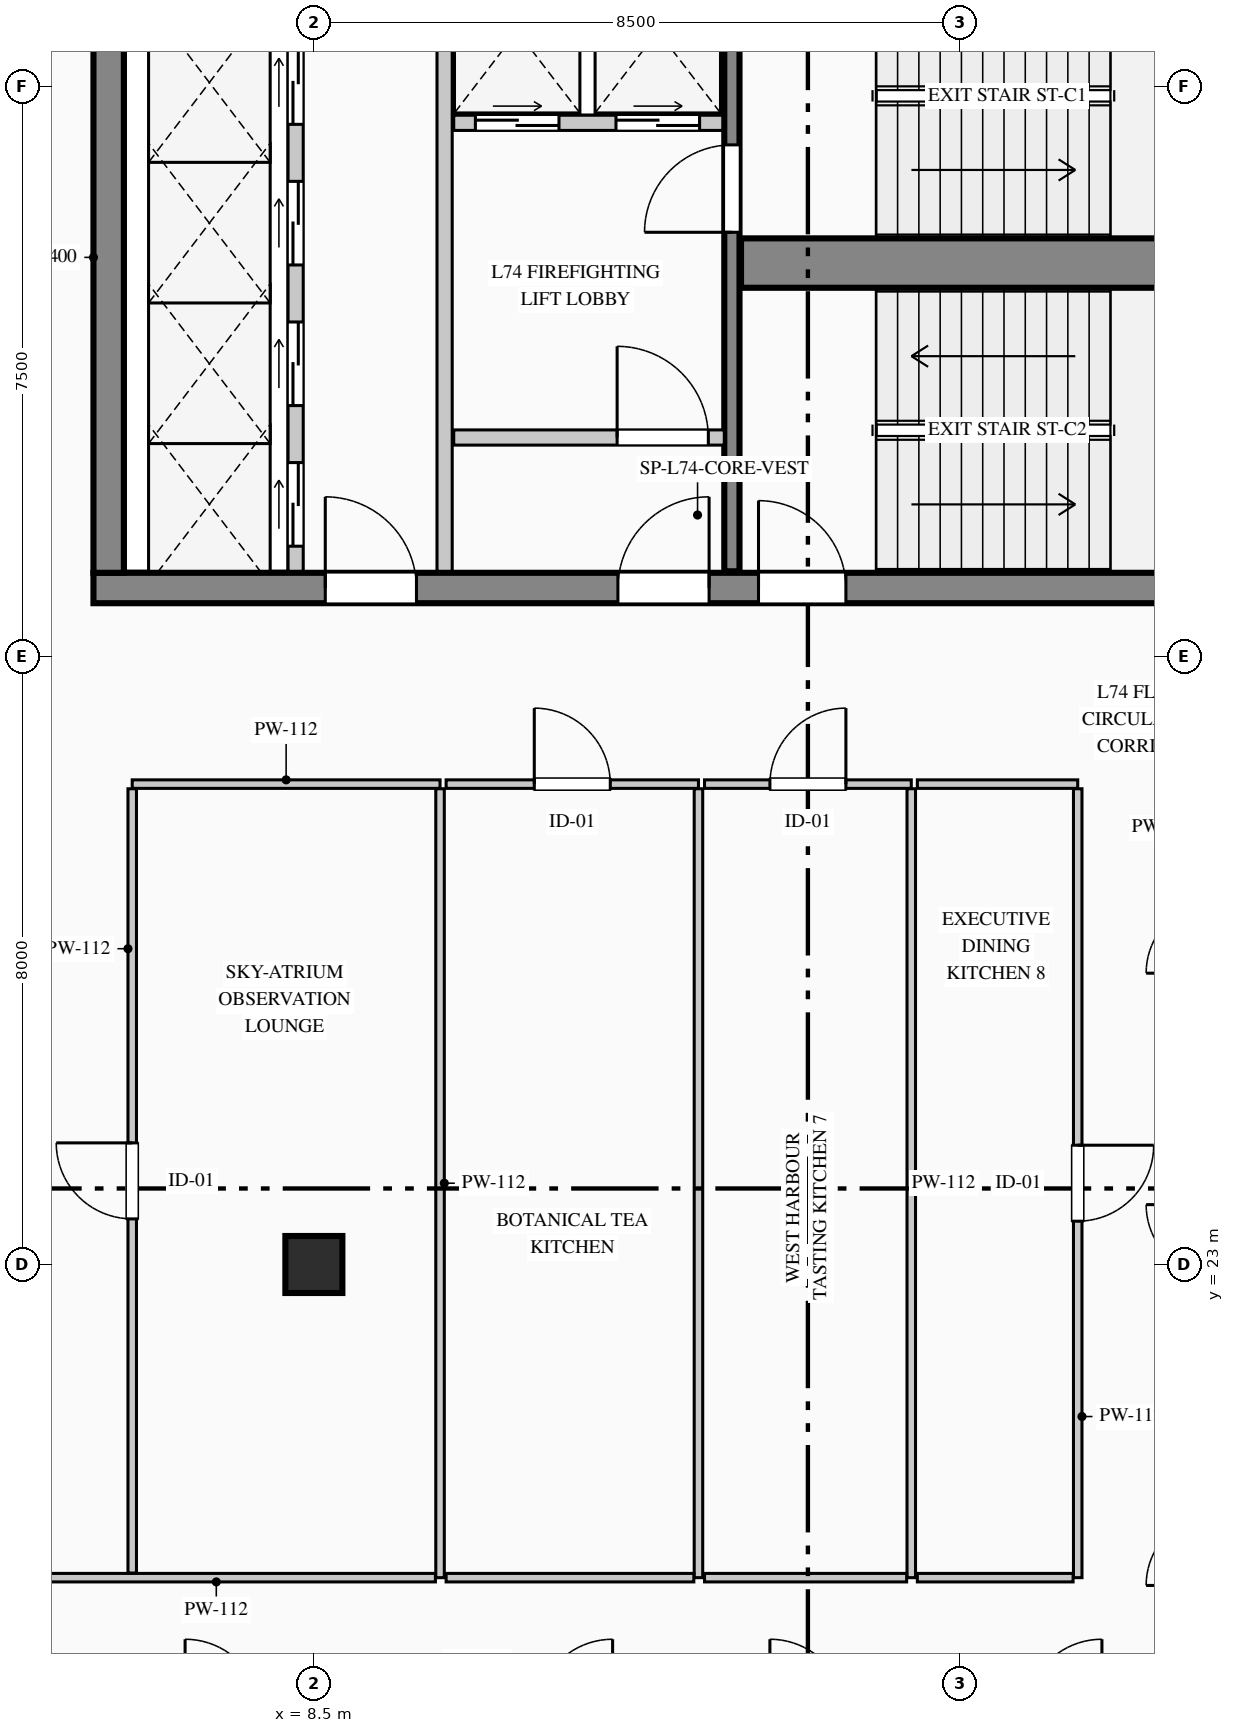
"""IFC4 building model, lengths in metres.
Left out: names, types, materials, properties, quantities, classifications, styles, units other than length and angle.
Written with IfcOpenShell. Run it as: python <this file> out.ifc"""

import sys

from ifc_helpers import new_model, si_unit, direction, frame, frame_2d, origin, origin_2d, place, context, subcontext, project, spatial, rectangle, extrude, element, fill, save


model = new_model("IFC4")
c1 = context("Model", 3, precision=1e-05, world=origin(), true_north=direction((0.0, 1.0)))
c2 = subcontext(c1, "Body", "Model", "MODEL_VIEW")
j1 = project(units=[si_unit("LENGTHUNIT", "METRE"), si_unit("PLANEANGLEUNIT", "RADIAN")], contexts=[c1])
p1 = place(None, origin())
s1 = spatial("IfcSite", under=j1, at=p1, CompositionType="ELEMENT")
p2 = place(p1, origin())
s2 = spatial("IfcBuilding", under=s1, at=p2, CompositionType="ELEMENT")
p3 = place(p2, frame((0.0, 0.0, 308.05)))
s3 = spatial("IfcBuildingStorey", under=s2, at=p3, CompositionType="ELEMENT", Elevation=308.05)
p4 = place(p3, frame((5.6, 31.9, 0.0), z_axis=(0.0, 0.0, 1.0), x_axis=(1.0, 0.0, 0.0)))
e1 = element("IfcWall", 1, at=p4, inside=s3, PredefinedType="SHEAR", context=c2, shape_type="SweptSolid", body=[
    extrude(rectangle(XDim=17.65, YDim=0.4, at=frame_2d((8.825, 0.0))), origin(), (0.0, 0.0, 1.0), 3.95),
])
p5 = place(p4, frame((3.05, 0.0, 0.0)))
e2 = element("IfcOpeningElement", 2, at=p5, cuts=e1, PredefinedType="OPENING", context=c2, shape_type="SweptSolid", body=[
    extrude(rectangle(XDim=1.2, YDim=2.2, at=frame_2d((0.6, 1.1))), frame((0.0, 0.21, 0.0), z_axis=(0.0, -1.0, 0.0), x_axis=(1.0, 0.0, 0.0)), (0.0, 0.0, 1.0), 0.42),
])
p6 = place(p4, frame((6.9, 0.0, 0.0)))
e3 = element("IfcOpeningElement", 3, at=p6, cuts=e1, PredefinedType="OPENING", context=c2, shape_type="SweptSolid", body=[
    extrude(rectangle(XDim=1.2, YDim=2.2, at=frame_2d((0.6, 1.1))), frame((0.0, 0.21, 0.0), z_axis=(0.0, -1.0, 0.0), x_axis=(1.0, 0.0, 0.0)), (0.0, 0.0, 1.0), 0.42),
])
p7 = place(p4, frame((8.75, 0.0, 0.0)))
e4 = element("IfcOpeningElement", 4, at=p7, cuts=e1, PredefinedType="OPENING", context=c2, shape_type="SweptSolid", body=[
    extrude(rectangle(XDim=1.15, YDim=2.2, at=frame_2d((0.575, 1.1))), frame((0.0, 0.21, 0.0), z_axis=(0.0, -1.0, 0.0), x_axis=(1.0, 0.0, 0.0)), (0.0, 0.0, 1.0), 0.42),
])
p8 = place(p4, frame((15.85, 0.0, 0.0)))
e5 = element("IfcOpeningElement", 5, at=p8, cuts=e1, PredefinedType="OPENING", context=c2, shape_type="SweptSolid", body=[
    extrude(rectangle(XDim=1.2, YDim=2.2, at=frame_2d((0.6, 1.1))), frame((0.0, 0.21, 0.0), z_axis=(0.0, -1.0, 0.0), x_axis=(1.0, 0.0, 0.0)), (0.0, 0.0, 1.0), 0.42),
])
p9 = place(p3, frame((5.8, 32.1, 0.0), z_axis=(0.0, 0.0, 1.0), x_axis=(0.0, 1.0, 0.0)))
e6 = element("IfcWall", 6, at=p9, inside=s3, PredefinedType="SHEAR", context=c2, shape_type="SweptSolid", body=[
    extrude(rectangle(XDim=8.3, YDim=0.4, at=frame_2d((4.15, 0.0))), origin(), (0.0, 0.0, 1.0), 3.95),
])
p10 = place(p3, frame((14.0, 32.12, 0.0), z_axis=(0.0, 0.0, 1.0), x_axis=(0.0, 1.0, 0.0)))
e7 = element("IfcWall", 7, at=p10, inside=s3, PredefinedType="SHEAR", context=c2, shape_type="SweptSolid", body=[
    extrude(rectangle(XDim=8.26, YDim=0.2, at=frame_2d((4.13, 0.0))), origin(), (0.0, 0.0, 1.0), 3.95),
])
p11 = place(p10, frame((4.46, 0.0, 0.0)))
e8 = element("IfcOpeningElement", 8, at=p11, cuts=e7, PredefinedType="OPENING", context=c2, shape_type="SweptSolid", body=[
    extrude(rectangle(XDim=1.15, YDim=2.2, at=frame_2d((0.575, 1.1))), frame((0.0, 0.11, 0.0), z_axis=(0.0, -1.0, 0.0), x_axis=(1.0, 0.0, 0.0)), (0.0, 0.0, 1.0), 0.22),
])
p12 = place(p3, frame((14.12, 36.175, 0.0), z_axis=(0.0, 0.0, 1.0), x_axis=(1.0, 0.0, 0.0)))
e9 = element("IfcWall", 9, at=p12, inside=s3, PredefinedType="SHEAR", context=c2, shape_type="SweptSolid", body=[
    extrude(rectangle(XDim=7.01, YDim=0.65, at=frame_2d((3.505, 0.0))), origin(), (0.0, 0.0, 1.0), 3.95),
])
p13 = place(p3, frame((8.5, 23.0, 0.0), z_axis=(0.0, 0.0, 1.0), x_axis=(1.0, 0.0, 0.0)))
e10 = element("IfcColumn", 10, at=p13, inside=s3, PredefinedType="COLUMN", context=c2, shape_type="SweptSolid", body=[
    extrude(rectangle(XDim=0.75, YDim=0.75, at=origin_2d()), origin(), (0.0, 0.0, 1.0), 3.95),
])
p14 = place(p3, frame((8.26, 32.12, 0.0), z_axis=(0.0, 0.0, 1.0), x_axis=(0.0, 1.0, 0.0)))
e11 = element("IfcWall", 11, at=p14, inside=s3, PredefinedType="PARTITIONING", context=c2, shape_type="SweptSolid", body=[
    extrude(rectangle(XDim=7.5, YDim=0.2, at=frame_2d((3.75, 0.0))), origin(), (0.0, 0.0, 1.0), 3.7),
])
p15 = place(p14, frame((0.33, 0.0, 0.0)))
e12 = element("IfcOpeningElement", 12, at=p15, cuts=e11, PredefinedType="OPENING", context=c2, shape_type="SweptSolid", body=[
    extrude(rectangle(XDim=1.1, YDim=2.2, at=frame_2d((0.55, 1.1))), frame((0.0, 0.11, 0.0), z_axis=(0.0, -1.0, 0.0), x_axis=(1.0, 0.0, 0.0)), (0.0, 0.0, 1.0), 0.22),
])
p16 = place(p14, frame((2.18, 0.0, 0.0)))
e13 = element("IfcOpeningElement", 13, at=p16, cuts=e11, PredefinedType="OPENING", context=c2, shape_type="SweptSolid", body=[
    extrude(rectangle(XDim=1.1, YDim=2.2, at=frame_2d((0.55, 1.1))), frame((0.0, 0.11, 0.0), z_axis=(0.0, -1.0, 0.0), x_axis=(1.0, 0.0, 0.0)), (0.0, 0.0, 1.0), 0.22),
])
p17 = place(p14, frame((4.03, 0.0, 0.0)))
e14 = element("IfcOpeningElement", 14, at=p17, cuts=e11, PredefinedType="OPENING", context=c2, shape_type="SweptSolid", body=[
    extrude(rectangle(XDim=1.1, YDim=2.2, at=frame_2d((0.55, 1.1))), frame((0.0, 0.11, 0.0), z_axis=(0.0, -1.0, 0.0), x_axis=(1.0, 0.0, 0.0)), (0.0, 0.0, 1.0), 0.22),
])
p18 = place(p14, frame((5.88, 0.0, 0.0)))
e15 = element("IfcOpeningElement", 15, at=p18, cuts=e11, PredefinedType="OPENING", context=c2, shape_type="SweptSolid", body=[
    extrude(rectangle(XDim=1.1, YDim=2.2, at=frame_2d((0.55, 1.1))), frame((0.0, 0.11, 0.0), z_axis=(0.0, -1.0, 0.0), x_axis=(1.0, 0.0, 0.0)), (0.0, 0.0, 1.0), 0.22),
])
p19 = place(p3, frame((10.22, 32.12, 0.0), z_axis=(0.0, 0.0, 1.0), x_axis=(0.0, 1.0, 0.0)))
e16 = element("IfcWall", 16, at=p19, inside=s3, PredefinedType="PARTITIONING", context=c2, shape_type="SweptSolid", body=[
    extrude(rectangle(XDim=8.26, YDim=0.2, at=frame_2d((4.13, 0.0))), origin(), (0.0, 0.0, 1.0), 3.7),
])
p20 = place(p3, frame((10.34, 38.02, 0.0), z_axis=(0.0, 0.0, 1.0), x_axis=(1.0, 0.0, 0.0)))
e17 = element("IfcWall", 17, at=p20, inside=s3, PredefinedType="PARTITIONING", context=c2, shape_type="SweptSolid", body=[
    extrude(rectangle(XDim=3.54, YDim=0.2, at=frame_2d((1.77, 0.0))), origin(), (0.0, 0.0, 1.0), 3.7),
])
p21 = place(p20, frame((0.285, 0.0, 0.0)))
e18 = element("IfcOpeningElement", 18, at=p21, cuts=e17, PredefinedType="OPENING", context=c2, shape_type="SweptSolid", body=[
    extrude(rectangle(XDim=1.1, YDim=2.2, at=frame_2d((0.55, 1.1))), frame((0.0, 0.11, 0.0), z_axis=(0.0, -1.0, 0.0), x_axis=(1.0, 0.0, 0.0)), (0.0, 0.0, 1.0), 0.22),
])
p22 = place(p20, frame((2.135, 0.0, 0.0)))
e19 = element("IfcOpeningElement", 19, at=p22, cuts=e17, PredefinedType="OPENING", context=c2, shape_type="SweptSolid", body=[
    extrude(rectangle(XDim=1.1, YDim=2.2, at=frame_2d((0.55, 1.1))), frame((0.0, 0.11, 0.0), z_axis=(0.0, -1.0, 0.0), x_axis=(1.0, 0.0, 0.0)), (0.0, 0.0, 1.0), 0.22),
])
p23 = place(p3, frame((10.34, 33.88, 0.0), z_axis=(0.0, 0.0, 1.0), x_axis=(1.0, 0.0, 0.0)))
e20 = element("IfcWall", 20, at=p23, inside=s3, PredefinedType="PARTITIONING", context=c2, shape_type="SweptSolid", body=[
    extrude(rectangle(XDim=3.56, YDim=0.2, at=frame_2d((1.78, 0.0))), origin(), (0.0, 0.0, 1.0), 3.7),
])
p24 = place(p23, frame((2.15, 0.0, 0.0)))
e21 = element("IfcOpeningElement", 21, at=p24, cuts=e20, PredefinedType="OPENING", context=c2, shape_type="SweptSolid", body=[
    extrude(rectangle(XDim=1.2, YDim=2.2, at=frame_2d((0.6, 1.1))), frame((0.0, 0.11, 0.0), z_axis=(0.0, -1.0, 0.0), x_axis=(1.0, 0.0, 0.0)), (0.0, 0.0, 1.0), 0.22),
])
p25 = place(p3, frame((6.11, 29.32, 0.0), z_axis=(0.0, 0.0, 1.0), x_axis=(1.0, 0.0, 0.0)))
e22 = element("IfcWall", 22, at=p25, inside=s3, PredefinedType="PARTITIONING", context=c2, shape_type="SweptSolid", body=[
    extrude(rectangle(XDim=4.05, YDim=0.112, at=frame_2d((2.025, 0.0))), origin(), (0.0, 0.0, 1.0), 3.7),
])
p26 = place(p3, frame((10.16, 29.259, 0.0), z_axis=(0.0, 0.0, 1.0), x_axis=(0.0, -1.0, 0.0)))
e23 = element("IfcWall", 23, at=p26, inside=s3, PredefinedType="PARTITIONING", context=c2, shape_type="SweptSolid", body=[
    extrude(rectangle(XDim=10.379, YDim=0.112, at=frame_2d((5.189, 0.0))), origin(), (0.0, 0.0, 1.0), 3.325),
])
p27 = place(p3, frame((10.099, 18.88, 0.0), z_axis=(0.0, 0.0, 1.0), x_axis=(-1.0, 0.0, 0.0)))
e24 = element("IfcWall", 24, at=p27, inside=s3, PredefinedType="PARTITIONING", context=c2, shape_type="SweptSolid", body=[
    extrude(rectangle(XDim=5.766, YDim=0.112, at=frame_2d((2.883, 0.0))), origin(), (0.0, 0.0, 1.0), 3.7),
])
p28 = place(p3, frame((6.11, 18.941, 0.0), z_axis=(0.0, 0.0, 1.0), x_axis=(0.0, 1.0, 0.0)))
e25 = element("IfcWall", 25, at=p28, inside=s3, PredefinedType="PARTITIONING", context=c2, shape_type="SweptSolid", body=[
    extrude(rectangle(XDim=10.318, YDim=0.112, at=frame_2d((5.159, 0.0))), origin(), (0.0, 0.0, 1.0), 3.7),
])
p29 = place(p28, frame((4.659, 0.0, 0.0)))
e26 = element("IfcOpeningElement", 26, at=p29, cuts=e25, PredefinedType="OPENING", context=c2, shape_type="SweptSolid", body=[
    extrude(rectangle(XDim=1.0, YDim=2.15, at=frame_2d((0.5, 1.075))), frame((0.0, 0.066, 0.0), z_axis=(0.0, -1.0, 0.0), x_axis=(1.0, 0.0, 0.0)), (0.0, 0.0, 1.0), 0.132),
])
p30 = place(p3, frame((10.24, 29.32, 0.0), z_axis=(0.0, 0.0, 1.0), x_axis=(1.0, 0.0, 0.0)))
e27 = element("IfcWall", 27, at=p30, inside=s3, PredefinedType="PARTITIONING", context=c2, shape_type="SweptSolid", body=[
    extrude(rectangle(XDim=3.32, YDim=0.112, at=frame_2d((1.66, 0.0))), origin(), (0.0, 0.0, 1.0), 3.7),
])
p31 = place(p30, frame((1.16, 0.0, 0.0)))
e28 = element("IfcOpeningElement", 28, at=p31, cuts=e27, PredefinedType="OPENING", context=c2, shape_type="SweptSolid", body=[
    extrude(rectangle(XDim=1.0, YDim=2.15, at=frame_2d((0.5, 1.075))), frame((0.0, 0.066, 0.0), z_axis=(0.0, -1.0, 0.0), x_axis=(1.0, 0.0, 0.0)), (0.0, 0.0, 1.0), 0.132),
])
p32 = place(p3, frame((13.56, 29.259, 0.0), z_axis=(0.0, 0.0, 1.0), x_axis=(0.0, -1.0, 0.0)))
e29 = element("IfcWall", 29, at=p32, inside=s3, PredefinedType="PARTITIONING", context=c2, shape_type="SweptSolid", body=[
    extrude(rectangle(XDim=10.379, YDim=0.112, at=frame_2d((5.189, 0.0))), origin(), (0.0, 0.0, 1.0), 3.7),
])
p33 = place(p3, frame((13.499, 18.88, 0.0), z_axis=(0.0, 0.0, 1.0), x_axis=(-1.0, 0.0, 0.0)))
e30 = element("IfcWall", 30, at=p33, inside=s3, PredefinedType="PARTITIONING", context=c2, shape_type="SweptSolid", body=[
    extrude(rectangle(XDim=3.259, YDim=0.112, at=frame_2d((1.629, 0.0))), origin(), (0.0, 0.0, 1.0), 3.7),
])
p34 = place(p3, frame((13.64, 29.32, 0.0), z_axis=(0.0, 0.0, 1.0), x_axis=(1.0, 0.0, 0.0)))
e31 = element("IfcWall", 31, at=p34, inside=s3, PredefinedType="PARTITIONING", context=c2, shape_type="SweptSolid", body=[
    extrude(rectangle(XDim=2.72, YDim=0.112, at=frame_2d((1.36, 0.0))), origin(), (0.0, 0.0, 1.0), 3.7),
])
p35 = place(p34, frame((0.86, 0.0, 0.0)))
e32 = element("IfcOpeningElement", 32, at=p35, cuts=e31, PredefinedType="OPENING", context=c2, shape_type="SweptSolid", body=[
    extrude(rectangle(XDim=1.0, YDim=2.15, at=frame_2d((0.5, 1.075))), frame((0.0, 0.066, 0.0), z_axis=(0.0, -1.0, 0.0), x_axis=(1.0, 0.0, 0.0)), (0.0, 0.0, 1.0), 0.132),
])
p36 = place(p3, frame((16.36, 29.259, 0.0), z_axis=(0.0, 0.0, 1.0), x_axis=(0.0, -1.0, 0.0)))
e33 = element("IfcWall", 33, at=p36, inside=s3, PredefinedType="PARTITIONING", context=c2, shape_type="SweptSolid", body=[
    extrude(rectangle(XDim=10.379, YDim=0.112, at=frame_2d((5.189, 0.0))), origin(), (0.0, 0.0, 1.0), 3.7),
])
p37 = place(p3, frame((16.299, 18.88, 0.0), z_axis=(0.0, 0.0, 1.0), x_axis=(-1.0, 0.0, 0.0)))
e34 = element("IfcWall", 34, at=p37, inside=s3, PredefinedType="PARTITIONING", context=c2, shape_type="SweptSolid", body=[
    extrude(rectangle(XDim=2.659, YDim=0.112, at=frame_2d((1.33, 0.0))), origin(), (0.0, 0.0, 1.0), 3.7),
])
p38 = place(p3, frame((16.44, 29.32, 0.0), z_axis=(0.0, 0.0, 1.0), x_axis=(1.0, 0.0, 0.0)))
e35 = element("IfcWall", 35, at=p38, inside=s3, PredefinedType="PARTITIONING", context=c2, shape_type="SweptSolid", body=[
    extrude(rectangle(XDim=2.11, YDim=0.112, at=frame_2d((1.055, 0.0))), origin(), (0.0, 0.0, 1.0), 3.7),
])
p39 = place(p3, frame((18.55, 29.259, 0.0), z_axis=(0.0, 0.0, 1.0), x_axis=(0.0, -1.0, 0.0)))
e36 = element("IfcWall", 36, at=p39, inside=s3, PredefinedType="PARTITIONING", context=c2, shape_type="SweptSolid", body=[
    extrude(rectangle(XDim=10.379, YDim=0.112, at=frame_2d((5.189, 0.0))), origin(), (0.0, 0.0, 1.0), 3.7),
])
p40 = place(p39, frame((4.689, 0.0, 0.0)))
e37 = element("IfcOpeningElement", 37, at=p40, cuts=e36, PredefinedType="OPENING", context=c2, shape_type="SweptSolid", body=[
    extrude(rectangle(XDim=1.0, YDim=2.15, at=frame_2d((0.5, 1.075))), frame((0.0, 0.066, 0.0), z_axis=(0.0, -1.0, 0.0), x_axis=(1.0, 0.0, 0.0)), (0.0, 0.0, 1.0), 0.132),
])
p41 = place(p3, frame((18.489, 18.88, 0.0), z_axis=(0.0, 0.0, 1.0), x_axis=(-1.0, 0.0, 0.0)))
e38 = element("IfcWall", 38, at=p41, inside=s3, PredefinedType="PARTITIONING", context=c2, shape_type="SweptSolid", body=[
    extrude(rectangle(XDim=2.049, YDim=0.112, at=frame_2d((1.024, 0.0))), origin(), (0.0, 0.0, 1.0), 3.7),
])
p42 = place(p5, origin())
e39 = element("IfcDoor", 39, at=p42, inside=s3, OperationType="SINGLE_SWING_LEFT", PredefinedType="DOOR", context=c2, shape_type="SweptSolid", body=[
    extrude(rectangle(XDim=1.2, YDim=2.2, at=frame_2d((0.6, 1.1))), frame((0.0, 0.025, 0.0), z_axis=(0.0, -1.0, 0.0), x_axis=(1.0, 0.0, 0.0)), (0.0, 0.0, 1.0), 0.05),
])
fill(e2, e39)
p43 = place(p6, origin())
e40 = element("IfcDoor", 40, at=p43, inside=s3, OperationType="SINGLE_SWING_RIGHT", PredefinedType="DOOR", context=c2, shape_type="SweptSolid", body=[
    extrude(rectangle(XDim=1.2, YDim=2.2, at=frame_2d((0.6, 1.1))), frame((0.0, 0.025, 0.0), z_axis=(0.0, -1.0, 0.0), x_axis=(1.0, 0.0, 0.0)), (0.0, 0.0, 1.0), 0.05),
])
fill(e3, e40)
p44 = place(p7, origin())
e41 = element("IfcDoor", 41, at=p44, inside=s3, OperationType="SINGLE_SWING_LEFT", PredefinedType="DOOR", context=c2, shape_type="SweptSolid", body=[
    extrude(rectangle(XDim=1.15, YDim=2.2, at=frame_2d((0.575, 1.1))), frame((0.0, 0.025, 0.0), z_axis=(0.0, -1.0, 0.0), x_axis=(1.0, 0.0, 0.0)), (0.0, 0.0, 1.0), 0.05),
])
fill(e4, e41)
p45 = place(p24, origin())
e42 = element("IfcDoor", 42, at=p45, inside=s3, OperationType="SINGLE_SWING_LEFT", PredefinedType="DOOR", context=c2, shape_type="SweptSolid", body=[
    extrude(rectangle(XDim=1.2, YDim=2.2, at=frame_2d((0.6, 1.1))), frame((0.0, 0.025, 0.0), z_axis=(0.0, -1.0, 0.0), x_axis=(1.0, 0.0, 0.0)), (0.0, 0.0, 1.0), 0.05),
])
fill(e21, e42)
p46 = place(p11, origin())
e43 = element("IfcDoor", 43, at=p46, inside=s3, OperationType="SINGLE_SWING_LEFT", PredefinedType="DOOR", context=c2, shape_type="SweptSolid", body=[
    extrude(rectangle(XDim=1.15, YDim=2.2, at=frame_2d((0.575, 1.1))), frame((0.0, 0.025, 0.0), z_axis=(0.0, -1.0, 0.0), x_axis=(1.0, 0.0, 0.0)), (0.0, 0.0, 1.0), 0.05),
])
fill(e8, e43)
p47 = place(p15, origin())
e44 = element("IfcDoor", 44, at=p47, inside=s3, OperationType="DOUBLE_DOOR_SLIDING", PredefinedType="DOOR", context=c2, shape_type="SweptSolid", body=[
    extrude(rectangle(XDim=1.1, YDim=2.2, at=frame_2d((0.55, 1.1))), frame((0.0, 0.025, 0.0), z_axis=(0.0, -1.0, 0.0), x_axis=(1.0, 0.0, 0.0)), (0.0, 0.0, 1.0), 0.05),
])
fill(e12, e44)
p48 = place(p16, origin())
e45 = element("IfcDoor", 45, at=p48, inside=s3, OperationType="DOUBLE_DOOR_SLIDING", PredefinedType="DOOR", context=c2, shape_type="SweptSolid", body=[
    extrude(rectangle(XDim=1.1, YDim=2.2, at=frame_2d((0.55, 1.1))), frame((0.0, 0.025, 0.0), z_axis=(0.0, -1.0, 0.0), x_axis=(1.0, 0.0, 0.0)), (0.0, 0.0, 1.0), 0.05),
])
fill(e13, e45)
p49 = place(p17, origin())
e46 = element("IfcDoor", 46, at=p49, inside=s3, OperationType="DOUBLE_DOOR_SLIDING", PredefinedType="DOOR", context=c2, shape_type="SweptSolid", body=[
    extrude(rectangle(XDim=1.1, YDim=2.2, at=frame_2d((0.55, 1.1))), frame((0.0, 0.025, 0.0), z_axis=(0.0, -1.0, 0.0), x_axis=(1.0, 0.0, 0.0)), (0.0, 0.0, 1.0), 0.05),
])
fill(e14, e46)
p50 = place(p18, origin())
e47 = element("IfcDoor", 47, at=p50, inside=s3, OperationType="DOUBLE_DOOR_SLIDING", PredefinedType="DOOR", context=c2, shape_type="SweptSolid", body=[
    extrude(rectangle(XDim=1.1, YDim=2.2, at=frame_2d((0.55, 1.1))), frame((0.0, 0.025, 0.0), z_axis=(0.0, -1.0, 0.0), x_axis=(1.0, 0.0, 0.0)), (0.0, 0.0, 1.0), 0.05),
])
fill(e15, e47)
p51 = place(p21, origin())
e48 = element("IfcDoor", 48, at=p51, inside=s3, OperationType="DOUBLE_DOOR_SLIDING", PredefinedType="DOOR", context=c2, shape_type="SweptSolid", body=[
    extrude(rectangle(XDim=1.1, YDim=2.2, at=frame_2d((0.55, 1.1))), frame((0.0, 0.025, 0.0), z_axis=(0.0, -1.0, 0.0), x_axis=(1.0, 0.0, 0.0)), (0.0, 0.0, 1.0), 0.05),
])
fill(e18, e48)
p52 = place(p22, origin())
e49 = element("IfcDoor", 49, at=p52, inside=s3, OperationType="DOUBLE_DOOR_SLIDING", PredefinedType="DOOR", context=c2, shape_type="SweptSolid", body=[
    extrude(rectangle(XDim=1.1, YDim=2.2, at=frame_2d((0.55, 1.1))), frame((0.0, 0.025, 0.0), z_axis=(0.0, -1.0, 0.0), x_axis=(1.0, 0.0, 0.0)), (0.0, 0.0, 1.0), 0.05),
])
fill(e19, e49)
p53 = place(p29, origin())
e50 = element("IfcDoor", 50, at=p53, inside=s3, OperationType="SINGLE_SWING_RIGHT", PredefinedType="DOOR", context=c2, shape_type="SweptSolid", body=[
    extrude(rectangle(XDim=1.0, YDim=2.15, at=frame_2d((0.5, 1.075))), frame((0.0, 0.025, 0.0), z_axis=(0.0, -1.0, 0.0), x_axis=(1.0, 0.0, 0.0)), (0.0, 0.0, 1.0), 0.05),
])
fill(e26, e50)
p54 = place(p31, origin())
e51 = element("IfcDoor", 51, at=p54, inside=s3, OperationType="SINGLE_SWING_LEFT", PredefinedType="DOOR", context=c2, shape_type="SweptSolid", body=[
    extrude(rectangle(XDim=1.0, YDim=2.15, at=frame_2d((0.5, 1.075))), frame((0.0, 0.025, 0.0), z_axis=(0.0, -1.0, 0.0), x_axis=(1.0, 0.0, 0.0)), (0.0, 0.0, 1.0), 0.05),
])
fill(e28, e51)
p55 = place(p35, origin())
e52 = element("IfcDoor", 52, at=p55, inside=s3, OperationType="SINGLE_SWING_RIGHT", PredefinedType="DOOR", context=c2, shape_type="SweptSolid", body=[
    extrude(rectangle(XDim=1.0, YDim=2.15, at=frame_2d((0.5, 1.075))), frame((0.0, 0.025, 0.0), z_axis=(0.0, -1.0, 0.0), x_axis=(1.0, 0.0, 0.0)), (0.0, 0.0, 1.0), 0.05),
])
fill(e32, e52)
p56 = place(p40, origin())
e53 = element("IfcDoor", 53, at=p56, inside=s3, OperationType="SINGLE_SWING_LEFT", PredefinedType="DOOR", context=c2, shape_type="SweptSolid", body=[
    extrude(rectangle(XDim=1.0, YDim=2.15, at=frame_2d((0.5, 1.075))), frame((0.0, 0.025, 0.0), z_axis=(0.0, -1.0, 0.0), x_axis=(1.0, 0.0, 0.0)), (0.0, 0.0, 1.0), 0.05),
])
fill(e37, e53)
save(model, sys.argv[1])
